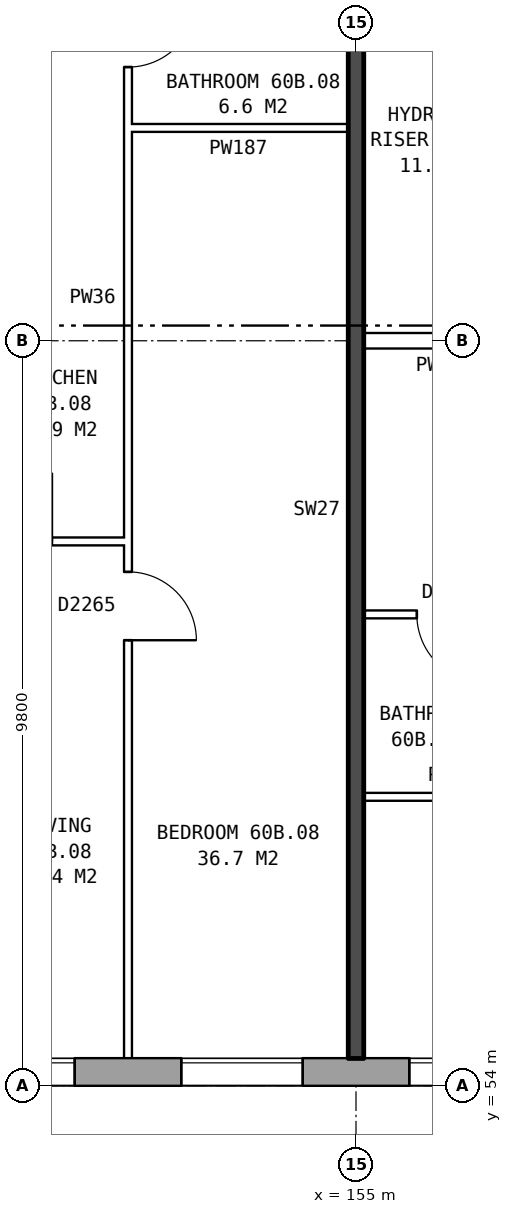
"""IFC4 building model, lengths in metres.
Left out: names, types, materials, properties, quantities, classifications, styles, units other than length and angle.
Written with IfcOpenShell. Run it as: python <this file> out.ifc"""

import sys

from ifc_helpers import new_model, si_unit, direction, frame, frame_2d, origin, place, context, subcontext, project, spatial, rectangle, extrude, element, fill, save


model = new_model("IFC4")
c1 = context("Model", 3, precision=1e-05, world=origin(), true_north=direction((0.0, 1.0)))
c2 = subcontext(c1, "Body", "Model", "MODEL_VIEW")
j1 = project(units=[si_unit("LENGTHUNIT", "METRE"), si_unit("PLANEANGLEUNIT", "RADIAN")], contexts=[c1])
p1 = place(None, origin())
s1 = spatial("IfcSite", under=j1, at=p1, CompositionType="ELEMENT")
p2 = place(p1, origin())
s2 = spatial("IfcBuilding", under=s1, at=p2, CompositionType="ELEMENT")
p3 = place(p2, frame((0.0, 0.0, 212.1)))
s3 = spatial("IfcBuildingStorey", under=s2, at=p3, CompositionType="ELEMENT", Elevation=212.1)
p4 = place(p3, frame((132.05, 54.18, 0.0), z_axis=(0.0, 0.0, 1.0), x_axis=(1.0, 0.0, 0.0)))
e1 = element("IfcWall", 1, at=p4, inside=s3, PredefinedType="STANDARD", context=c2, shape_type="SweptSolid", body=[
    extrude(rectangle(XDim=33.875, YDim=0.36, at=frame_2d((16.938, 0.0))), origin(), (0.0, 0.0, 1.0), 2.85),
])
p5 = place(p4, frame((2.65, 0.0, 0.8)))
e2 = element("IfcOpeningElement", 2, at=p5, cuts=e1, PredefinedType="OPENING", context=c2, shape_type="SweptSolid", body=[
    extrude(rectangle(XDim=1.6, YDim=1.8, at=frame_2d((0.8, 0.9))), frame((0.0, 0.19, 0.0), z_axis=(0.0, -1.0, 0.0), x_axis=(1.0, 0.0, 0.0)), (0.0, 0.0, 1.0), 0.38),
])
p6 = place(p4, frame((6.6, 0.0, 0.8)))
e3 = element("IfcOpeningElement", 3, at=p6, cuts=e1, PredefinedType="OPENING", context=c2, shape_type="SweptSolid", body=[
    extrude(rectangle(XDim=1.6, YDim=1.8, at=frame_2d((0.8, 0.9))), frame((0.0, 0.19, 0.0), z_axis=(0.0, -1.0, 0.0), x_axis=(1.0, 0.0, 0.0)), (0.0, 0.0, 1.0), 0.38),
])
p7 = place(p4, frame((8.65, 0.0, 0.8)))
e4 = element("IfcOpeningElement", 4, at=p7, cuts=e1, PredefinedType="OPENING", context=c2, shape_type="SweptSolid", body=[
    extrude(rectangle(XDim=1.6, YDim=1.8, at=frame_2d((0.8, 0.9))), frame((0.0, 0.19, 0.0), z_axis=(0.0, -1.0, 0.0), x_axis=(1.0, 0.0, 0.0)), (0.0, 0.0, 1.0), 0.38),
])
p8 = place(p4, frame((11.65, 0.0, 0.8)))
e5 = element("IfcOpeningElement", 5, at=p8, cuts=e1, PredefinedType="OPENING", context=c2, shape_type="SweptSolid", body=[
    extrude(rectangle(XDim=1.6, YDim=1.8, at=frame_2d((0.8, 0.9))), frame((0.0, 0.19, 0.0), z_axis=(0.0, -1.0, 0.0), x_axis=(1.0, 0.0, 0.0)), (0.0, 0.0, 1.0), 0.38),
])
p9 = place(p4, frame((14.65, 0.0, 0.8)))
e6 = element("IfcOpeningElement", 6, at=p9, cuts=e1, PredefinedType="OPENING", context=c2, shape_type="SweptSolid", body=[
    extrude(rectangle(XDim=1.6, YDim=1.8, at=frame_2d((0.8, 0.9))), frame((0.0, 0.19, 0.0), z_axis=(0.0, -1.0, 0.0), x_axis=(1.0, 0.0, 0.0)), (0.0, 0.0, 1.0), 0.38),
])
p10 = place(p4, frame((17.65, 0.0, 0.8)))
e7 = element("IfcOpeningElement", 7, at=p10, cuts=e1, PredefinedType="OPENING", context=c2, shape_type="SweptSolid", body=[
    extrude(rectangle(XDim=1.6, YDim=1.8, at=frame_2d((0.8, 0.9))), frame((0.0, 0.19, 0.0), z_axis=(0.0, -1.0, 0.0), x_axis=(1.0, 0.0, 0.0)), (0.0, 0.0, 1.0), 0.38),
])
p11 = place(p4, frame((20.65, 0.0, 0.8)))
e8 = element("IfcOpeningElement", 8, at=p11, cuts=e1, PredefinedType="OPENING", context=c2, shape_type="SweptSolid", body=[
    extrude(rectangle(XDim=1.6, YDim=1.8, at=frame_2d((0.8, 0.9))), frame((0.0, 0.19, 0.0), z_axis=(0.0, -1.0, 0.0), x_axis=(1.0, 0.0, 0.0)), (0.0, 0.0, 1.0), 0.38),
])
p12 = place(p4, frame((23.65, 0.0, 0.8)))
e9 = element("IfcOpeningElement", 9, at=p12, cuts=e1, PredefinedType="OPENING", context=c2, shape_type="SweptSolid", body=[
    extrude(rectangle(XDim=1.6, YDim=1.8, at=frame_2d((0.8, 0.9))), frame((0.0, 0.19, 0.0), z_axis=(0.0, -1.0, 0.0), x_axis=(1.0, 0.0, 0.0)), (0.0, 0.0, 1.0), 0.38),
])
p13 = place(p4, frame((26.65, 0.0, 0.8)))
e10 = element("IfcOpeningElement", 10, at=p13, cuts=e1, PredefinedType="OPENING", context=c2, shape_type="SweptSolid", body=[
    extrude(rectangle(XDim=1.6, YDim=1.8, at=frame_2d((0.8, 0.9))), frame((0.0, 0.19, 0.0), z_axis=(0.0, -1.0, 0.0), x_axis=(1.0, 0.0, 0.0)), (0.0, 0.0, 1.0), 0.38),
])
p14 = place(p4, frame((29.15, 0.0, 0.8)))
e11 = element("IfcOpeningElement", 11, at=p14, cuts=e1, PredefinedType="OPENING", context=c2, shape_type="SweptSolid", body=[
    extrude(rectangle(XDim=0.6, YDim=0.9, at=frame_2d((0.3, 0.45))), frame((0.0, 0.19, 0.0), z_axis=(0.0, -1.0, 0.0), x_axis=(1.0, 0.0, 0.0)), (0.0, 0.0, 1.0), 0.38),
])
p15 = place(p4, frame((31.25, 0.0, 1.1)))
e12 = element("IfcOpeningElement", 12, at=p15, cuts=e1, PredefinedType="OPENING", context=c2, shape_type="SweptSolid", body=[
    extrude(rectangle(XDim=1.4, YDim=1.5, at=frame_2d((0.7, 0.75))), frame((0.0, 0.19, 0.0), z_axis=(0.0, -1.0, 0.0), x_axis=(1.0, 0.0, 0.0)), (0.0, 0.0, 1.0), 0.38),
])
p16 = place(p4, frame((32.95, 0.0, 0.8)))
e13 = element("IfcOpeningElement", 13, at=p16, cuts=e1, PredefinedType="OPENING", context=c2, shape_type="SweptSolid", body=[
    extrude(rectangle(XDim=0.6, YDim=1.8, at=frame_2d((0.3, 0.9))), frame((0.0, 0.19, 0.0), z_axis=(0.0, -1.0, 0.0), x_axis=(1.0, 0.0, 0.0)), (0.0, 0.0, 1.0), 0.38),
])
p17 = place(p3, frame((155.1, 57.8, 0.0), z_axis=(0.0, 0.0, 1.0), x_axis=(1.0, 0.0, 0.0)))
e14 = element("IfcWall", 14, at=p17, inside=s3, PredefinedType="PARTITIONING", context=c2, shape_type="SweptSolid", body=[
    extrude(rectangle(XDim=2.3, YDim=0.1, at=frame_2d((1.15, 0.0))), origin(), (0.0, 0.0, 1.0), 2.85),
])
p18 = place(p3, frame((155.1, 60.2, 0.0), z_axis=(0.0, 0.0, 1.0), x_axis=(1.0, 0.0, 0.0)))
e15 = element("IfcWall", 15, at=p18, inside=s3, PredefinedType="PARTITIONING", context=c2, shape_type="SweptSolid", body=[
    extrude(rectangle(XDim=5.8, YDim=0.1, at=frame_2d((2.9, 0.0))), origin(), (0.0, 0.0, 1.0), 2.85),
])
p19 = place(p18, frame((3.6, 0.0, 0.0)))
e16 = element("IfcOpeningElement", 16, at=p19, cuts=e15, PredefinedType="OPENING", context=c2, shape_type="SweptSolid", body=[
    extrude(rectangle(XDim=0.9, YDim=2.1, at=frame_2d((0.45, 1.05))), frame((0.0, 0.06, 0.0), z_axis=(0.0, -1.0, 0.0), x_axis=(1.0, 0.0, 0.0)), (0.0, 0.0, 1.0), 0.12),
])
p20 = place(p18, frame((0.7, 0.0, 0.0)))
e17 = element("IfcOpeningElement", 17, at=p20, cuts=e15, PredefinedType="OPENING", context=c2, shape_type="SweptSolid", body=[
    extrude(rectangle(XDim=0.9, YDim=2.1, at=frame_2d((0.45, 1.05))), frame((0.0, 0.06, 0.0), z_axis=(0.0, -1.0, 0.0), x_axis=(1.0, 0.0, 0.0)), (0.0, 0.0, 1.0), 0.12),
])
p21 = place(p3, frame((149.1, 61.16, 0.0), z_axis=(0.0, 0.0, 1.0), x_axis=(1.0, 0.0, 0.0)))
e18 = element("IfcWall", 18, at=p21, inside=s3, PredefinedType="PARTITIONING", context=c2, shape_type="SweptSolid", body=[
    extrude(rectangle(XDim=2.9, YDim=0.1, at=frame_2d((1.45, 0.0))), origin(), (0.0, 0.0, 1.0), 2.85),
])
p22 = place(p21, frame((1.0, 0.0, 0.0)))
e19 = element("IfcOpeningElement", 19, at=p22, cuts=e18, PredefinedType="OPENING", context=c2, shape_type="SweptSolid", body=[
    extrude(rectangle(XDim=0.9, YDim=2.1, at=frame_2d((0.45, 1.05))), frame((0.0, 0.06, 0.0), z_axis=(0.0, -1.0, 0.0), x_axis=(1.0, 0.0, 0.0)), (0.0, 0.0, 1.0), 0.12),
])
p23 = place(p3, frame((155.1, 63.8, 0.0), z_axis=(0.0, 0.0, 1.0), x_axis=(1.0, 0.0, 0.0)))
e20 = element("IfcWall", 20, at=p23, inside=s3, PredefinedType="PARTITIONING", context=c2, shape_type="SweptSolid", body=[
    extrude(rectangle(XDim=2.14, YDim=0.2, at=frame_2d((1.07, 0.0))), origin(), (0.0, 0.0, 1.0), 2.85),
])
p24 = place(p3, frame((152.0, 66.6, 0.0), z_axis=(0.0, 0.0, 1.0), x_axis=(1.0, 0.0, 0.0)))
e21 = element("IfcWall", 21, at=p24, inside=s3, PredefinedType="PARTITIONING", context=c2, shape_type="SweptSolid", body=[
    extrude(rectangle(XDim=2.9, YDim=0.1, at=frame_2d((1.45, 0.0))), origin(), (0.0, 0.0, 1.0), 2.85),
])
p25 = place(p3, frame((152.0, 54.36, 0.0), z_axis=(0.0, 0.0, 1.0), x_axis=(0.0, 1.0, 0.0)))
e22 = element("IfcWall", 22, at=p25, inside=s3, PredefinedType="PARTITIONING", context=c2, shape_type="SweptSolid", body=[
    extrude(rectangle(XDim=14.34, YDim=0.1, at=frame_2d((7.17, 0.0))), origin(), (0.0, 0.0, 1.0), 2.85),
])
p26 = place(p25, frame((5.5, 0.0, 0.0)))
e23 = element("IfcOpeningElement", 23, at=p26, cuts=e22, PredefinedType="OPENING", context=c2, shape_type="SweptSolid", body=[
    extrude(rectangle(XDim=0.9, YDim=2.1, at=frame_2d((0.45, 1.05))), frame((0.0, 0.06, 0.0), z_axis=(0.0, -1.0, 0.0), x_axis=(1.0, 0.0, 0.0)), (0.0, 0.0, 1.0), 0.12),
])
p27 = place(p25, frame((13.04, 0.0, 0.0)))
e24 = element("IfcOpeningElement", 24, at=p27, cuts=e22, PredefinedType="OPENING", context=c2, shape_type="SweptSolid", body=[
    extrude(rectangle(XDim=0.9, YDim=2.1, at=frame_2d((0.45, 1.05))), frame((0.0, 0.06, 0.0), z_axis=(0.0, -1.0, 0.0), x_axis=(1.0, 0.0, 0.0)), (0.0, 0.0, 1.0), 0.12),
])
p28 = place(p3, frame((155.0, 54.36, 0.0), z_axis=(0.0, 0.0, 1.0), x_axis=(0.0, 1.0, 0.0)))
e25 = element("IfcWall", 25, at=p28, inside=s3, PredefinedType="SOLIDWALL", context=c2, shape_type="SweptSolid", body=[
    extrude(rectangle(XDim=14.44, YDim=0.2, at=frame_2d((7.22, 0.0))), origin(), (0.0, 0.0, 1.0), 2.85),
])
p29 = place(p10, origin())
e26 = element("IfcWindow", 26, at=p29, inside=s3, PartitioningType="SINGLE_PANEL", PredefinedType="WINDOW", context=c2, shape_type="SweptSolid", body=[
    extrude(rectangle(XDim=1.6, YDim=1.8, at=frame_2d((0.8, 0.9))), frame((0.0, 0.15, 0.0), z_axis=(0.0, -1.0, 0.0), x_axis=(1.0, 0.0, 0.0)), (0.0, 0.0, 1.0), 0.06),
])
fill(e7, e26)
p30 = place(p11, origin())
e27 = element("IfcWindow", 27, at=p30, inside=s3, PartitioningType="SINGLE_PANEL", PredefinedType="WINDOW", context=c2, shape_type="SweptSolid", body=[
    extrude(rectangle(XDim=1.6, YDim=1.8, at=frame_2d((0.8, 0.9))), frame((0.0, 0.15, 0.0), z_axis=(0.0, -1.0, 0.0), x_axis=(1.0, 0.0, 0.0)), (0.0, 0.0, 1.0), 0.06),
])
fill(e8, e27)
p31 = place(p12, origin())
e28 = element("IfcWindow", 28, at=p31, inside=s3, PartitioningType="SINGLE_PANEL", PredefinedType="WINDOW", context=c2, shape_type="SweptSolid", body=[
    extrude(rectangle(XDim=1.6, YDim=1.8, at=frame_2d((0.8, 0.9))), frame((0.0, 0.15, 0.0), z_axis=(0.0, -1.0, 0.0), x_axis=(1.0, 0.0, 0.0)), (0.0, 0.0, 1.0), 0.06),
])
fill(e9, e28)
p32 = place(p20, frame((0.9, 0.0, 0.0), z_axis=(0.0, 0.0, 1.0), x_axis=(-1.0, 0.0, 0.0)))
e29 = element("IfcDoor", 29, at=p32, inside=s3, OperationType="SINGLE_SWING_LEFT", PredefinedType="DOOR", context=c2, shape_type="SweptSolid", body=[
    extrude(rectangle(XDim=0.9, YDim=2.1, at=frame_2d((0.45, 1.05))), frame((0.0, 0.025, 0.0), z_axis=(0.0, -1.0, 0.0), x_axis=(1.0, 0.0, 0.0)), (0.0, 0.0, 1.0), 0.05),
])
fill(e17, e29)
p33 = place(p26, frame((0.9, 0.0, 0.0), z_axis=(0.0, 0.0, 1.0), x_axis=(-1.0, 0.0, 0.0)))
e30 = element("IfcDoor", 30, at=p33, inside=s3, OperationType="SINGLE_SWING_RIGHT", PredefinedType="DOOR", context=c2, shape_type="SweptSolid", body=[
    extrude(rectangle(XDim=0.9, YDim=2.1, at=frame_2d((0.45, 1.05))), frame((0.0, 0.025, 0.0), z_axis=(0.0, -1.0, 0.0), x_axis=(1.0, 0.0, 0.0)), (0.0, 0.0, 1.0), 0.05),
])
fill(e23, e30)
p34 = place(p27, frame((0.9, 0.0, 0.0), z_axis=(0.0, 0.0, 1.0), x_axis=(-1.0, 0.0, 0.0)))
e31 = element("IfcDoor", 31, at=p34, inside=s3, OperationType="SINGLE_SWING_LEFT", PredefinedType="DOOR", context=c2, shape_type="SweptSolid", body=[
    extrude(rectangle(XDim=0.9, YDim=2.1, at=frame_2d((0.45, 1.05))), frame((0.0, 0.025, 0.0), z_axis=(0.0, -1.0, 0.0), x_axis=(1.0, 0.0, 0.0)), (0.0, 0.0, 1.0), 0.05),
])
fill(e24, e31)
save(model, sys.argv[1])
